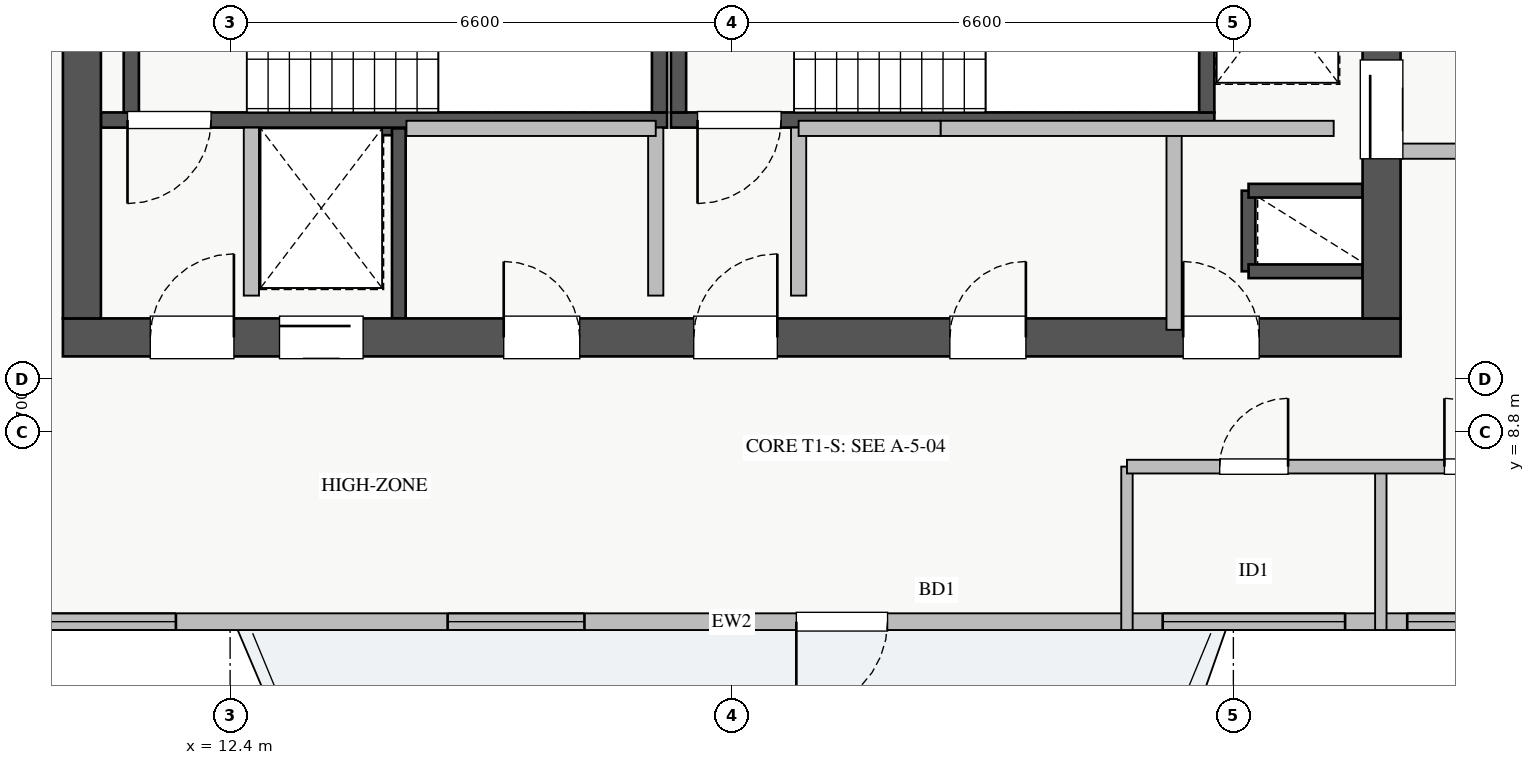
"""IFC4 building model, lengths in metres.
Left out: names, types, materials, properties, quantities, classifications, styles, units other than length and angle.
Written with IfcOpenShell. Run it as: python <this file> out.ifc"""

import sys

from ifc_helpers import new_model, si_unit, direction, frame, frame_2d, origin, place, context, subcontext, project, spatial, rectangle, extrude, source, transform, mapped, element, fill, save


model = new_model("IFC4")
c1 = context("Model", 3, precision=1e-05, world=origin(), true_north=direction((0.0, 1.0)))
c2 = subcontext(c1, "Body", "Model", "MODEL_VIEW")
j1 = project(units=[si_unit("LENGTHUNIT", "METRE"), si_unit("PLANEANGLEUNIT", "RADIAN")], contexts=[c1])
p1 = place(None, origin())
s1 = spatial("IfcSite", under=j1, at=p1, CompositionType="ELEMENT")
p2 = place(p1, origin())
s2 = spatial("IfcBuilding", under=s1, at=p2, CompositionType="ELEMENT")
p3 = place(p2, frame((0.0, 0.0, 197.0)))
s3 = spatial("IfcBuildingStorey", under=s2, at=p3, CompositionType="ELEMENT", Elevation=197.0)
p4 = place(p3, frame((12.68, 12.8, 0.0), z_axis=(0.0, 0.0, 1.0), x_axis=(1.0, 0.0, 0.0)))
e1 = element("IfcWall", 1, at=p4, inside=s3, PredefinedType="SHEAR", context=c2, shape_type="SweptSolid", body=[
    extrude(rectangle(XDim=1.94, YDim=0.18, at=frame_2d((0.97, 0.0))), origin(), (0.0, 0.0, 1.0), 3.07),
])
p5 = place(p3, frame((14.62, 10.3, 0.0), z_axis=(0.0, 0.0, 1.0), x_axis=(0.0, 1.0, 0.0)))
e2 = element("IfcWall", 2, at=p5, inside=s3, PredefinedType="SHEAR", context=c2, shape_type="SweptSolid", body=[
    extrude(rectangle(XDim=2.5, YDim=0.18, at=frame_2d((1.25, 0.0))), origin(), (0.0, 0.0, 1.0), 3.07),
])
p6 = place(p3, frame((25.8, 10.92, 0.0), z_axis=(0.0, 0.0, 1.0), x_axis=(0.0, 1.0, 0.0)))
e3 = element("IfcWall", 3, at=p6, inside=s3, PredefinedType="SHEAR", context=c2, shape_type="SweptSolid", body=[
    extrude(rectangle(XDim=1.06, YDim=0.18, at=frame_2d((0.53, 0.0))), origin(), (0.0, 0.0, 1.0), 3.07),
])
for number, where, z_axis, x_axis in (
    (4, (25.8, 11.98, 0.0), (0.0, 0.0, 1.0), (1.0, 0.0, 0.0)),
    (5, (25.8, 10.92, 0.0), (0.0, 0.0, 1.0), (1.0, 0.0, 0.0)),
):
    element("IfcWall", number, at=place(p3, frame(where, z_axis=z_axis, x_axis=x_axis)), inside=s3, PredefinedType="SHEAR", context=c2, shape_type="SweptSolid", body=[
        extrude(rectangle(XDim=1.5, YDim=0.18, at=frame_2d((0.75, 0.0))), origin(), (0.0, 0.0, 1.0), 3.07),
    ])
p7 = place(p3, frame((10.7, 12.91, 0.0), z_axis=(0.0, 0.0, 1.0), x_axis=(1.0, 0.0, 0.0)))
e6 = element("IfcWall", 6, at=p7, inside=s3, PredefinedType="SHEAR", context=c2, shape_type="SweptSolid", body=[
    extrude(rectangle(XDim=7.45, YDim=0.2, at=frame_2d((3.725, 0.0))), origin(), (0.0, 0.0, 1.0), 3.25),
])
p8 = place(p7, frame((0.35, 0.0, 0.0)))
e7 = element("IfcOpeningElement", 7, at=p8, cuts=e6, PredefinedType="OPENING", context=c2, shape_type="SweptSolid", body=[
    extrude(rectangle(XDim=1.1, YDim=2.05, at=frame_2d((0.55, 1.025))), frame((0.0, 0.11, 0.0), z_axis=(0.0, -1.0, 0.0), x_axis=(1.0, 0.0, 0.0)), (0.0, 0.0, 1.0), 0.22),
])
for number, where, z_axis, x_axis in (
    (8, (11.1, 13.01, 0.0), (0.0, 0.0, 1.0), (0.0, 1.0, 0.0)),
    (9, (18.05, 13.01, 0.0), (0.0, 0.0, 1.0), (0.0, 1.0, 0.0)),
):
    element("IfcWall", number, at=place(p3, frame(where, z_axis=z_axis, x_axis=x_axis)), inside=s3, PredefinedType="SHEAR", context=c2, shape_type="SweptSolid", body=[
        extrude(rectangle(XDim=2.94, YDim=0.2, at=frame_2d((1.47, 0.0))), origin(), (0.0, 0.0, 1.0), 3.25),
    ])
p9 = place(p3, frame((18.2, 12.91, 0.0), z_axis=(0.0, 0.0, 1.0), x_axis=(1.0, 0.0, 0.0)))
e10 = element("IfcWall", 10, at=p9, inside=s3, PredefinedType="SHEAR", context=c2, shape_type="SweptSolid", body=[
    extrude(rectangle(XDim=7.15, YDim=0.2, at=frame_2d((3.575, 0.0))), origin(), (0.0, 0.0, 1.0), 3.25),
])
p10 = place(p9, frame((0.35, 0.0, 0.0)))
e11 = element("IfcOpeningElement", 11, at=p10, cuts=e10, PredefinedType="OPENING", context=c2, shape_type="SweptSolid", body=[
    extrude(rectangle(XDim=1.1, YDim=2.05, at=frame_2d((0.55, 1.025))), frame((0.0, 0.11, 0.0), z_axis=(0.0, -1.0, 0.0), x_axis=(1.0, 0.0, 0.0)), (0.0, 0.0, 1.0), 0.22),
])
for number, where, z_axis, x_axis in (
    (12, (18.3, 13.01, 0.0), (0.0, 0.0, 1.0), (0.0, 1.0, 0.0)),
    (13, (25.25, 13.01, 0.0), (0.0, 0.0, 1.0), (0.0, 1.0, 0.0)),
):
    element("IfcWall", number, at=place(p3, frame(where, z_axis=z_axis, x_axis=x_axis)), inside=s3, PredefinedType="SHEAR", context=c2, shape_type="SweptSolid", body=[
        extrude(rectangle(XDim=2.94, YDim=0.2, at=frame_2d((1.47, 0.0))), origin(), (0.0, 0.0, 1.0), 3.25),
    ])
p11 = place(p3, frame((10.2, 10.05, 0.0), z_axis=(0.0, 0.0, 1.0), x_axis=(1.0, 0.0, 0.0)))
e14 = element("IfcWall", 14, at=p11, inside=s3, PredefinedType="SHEAR", context=c2, shape_type="SweptSolid", body=[
    extrude(rectangle(XDim=17.6, YDim=0.5, at=frame_2d((8.8, 0.0))), origin(), (0.0, 0.0, 1.0), 3.25),
])
p12 = place(p11, frame((1.15, 0.0, 0.0)))
e15 = element("IfcOpeningElement", 15, at=p12, cuts=e14, PredefinedType="OPENING", context=c2, shape_type="SweptSolid", body=[
    extrude(rectangle(XDim=1.1, YDim=2.05, at=frame_2d((0.55, 1.025))), frame((0.0, 0.26, 0.0), z_axis=(0.0, -1.0, 0.0), x_axis=(1.0, 0.0, 0.0)), (0.0, 0.0, 1.0), 0.52),
])
p13 = place(p11, frame((8.3, 0.0, 0.0)))
e16 = element("IfcOpeningElement", 16, at=p13, cuts=e14, PredefinedType="OPENING", context=c2, shape_type="SweptSolid", body=[
    extrude(rectangle(XDim=1.1, YDim=2.05, at=frame_2d((0.55, 1.025))), frame((0.0, 0.26, 0.0), z_axis=(0.0, -1.0, 0.0), x_axis=(1.0, 0.0, 0.0)), (0.0, 0.0, 1.0), 0.52),
])
p14 = place(p11, frame((2.85, 0.0, 0.0)))
e17 = element("IfcOpeningElement", 17, at=p14, cuts=e14, PredefinedType="OPENING", context=c2, shape_type="SweptSolid", body=[
    extrude(rectangle(XDim=1.1, YDim=2.05, at=frame_2d((0.55, 1.025))), frame((0.0, 0.26, 0.0), z_axis=(0.0, -1.0, 0.0), x_axis=(1.0, 0.0, 0.0)), (0.0, 0.0, 1.0), 0.52),
])
p15 = place(p11, frame((5.8, 0.0, 0.0)))
e18 = element("IfcOpeningElement", 18, at=p15, cuts=e14, PredefinedType="OPENING", context=c2, shape_type="SweptSolid", body=[
    extrude(rectangle(XDim=1.0, YDim=2.05, at=frame_2d((0.5, 1.025))), frame((0.0, 0.26, 0.0), z_axis=(0.0, -1.0, 0.0), x_axis=(1.0, 0.0, 0.0)), (0.0, 0.0, 1.0), 0.52),
])
p16 = place(p11, frame((14.74, 0.0, 0.0)))
e19 = element("IfcOpeningElement", 19, at=p16, cuts=e14, PredefinedType="OPENING", context=c2, shape_type="SweptSolid", body=[
    extrude(rectangle(XDim=1.0, YDim=2.05, at=frame_2d((0.5, 1.025))), frame((0.0, 0.26, 0.0), z_axis=(0.0, -1.0, 0.0), x_axis=(1.0, 0.0, 0.0)), (0.0, 0.0, 1.0), 0.52),
])
p17 = place(p11, frame((11.67, 0.0, 0.0)))
e20 = element("IfcOpeningElement", 20, at=p17, cuts=e14, PredefinedType="OPENING", context=c2, shape_type="SweptSolid", body=[
    extrude(rectangle(XDim=1.0, YDim=2.05, at=frame_2d((0.5, 1.025))), frame((0.0, 0.26, 0.0), z_axis=(0.0, -1.0, 0.0), x_axis=(1.0, 0.0, 0.0)), (0.0, 0.0, 1.0), 0.52),
])
p18 = place(p3, frame((10.45, 10.3, 0.0), z_axis=(0.0, 0.0, 1.0), x_axis=(0.0, 1.0, 0.0)))
e21 = element("IfcWall", 21, at=p18, inside=s3, PredefinedType="SHEAR", context=c2, shape_type="SweptSolid", body=[
    extrude(rectangle(XDim=6.2, YDim=0.5, at=frame_2d((3.1, 0.0))), origin(), (0.0, 0.0, 1.0), 3.25),
])
p19 = place(p3, frame((27.55, 10.3, 0.0), z_axis=(0.0, 0.0, 1.0), x_axis=(0.0, 1.0, 0.0)))
e22 = element("IfcWall", 22, at=p19, inside=s3, PredefinedType="SHEAR", context=c2, shape_type="SweptSolid", body=[
    extrude(rectangle(XDim=6.2, YDim=0.5, at=frame_2d((3.1, 0.0))), origin(), (0.0, 0.0, 1.0), 3.25),
])
p20 = place(p19, frame((2.1, 0.0, 0.0)))
e23 = element("IfcOpeningElement", 23, at=p20, cuts=e22, PredefinedType="OPENING", context=c2, shape_type="SweptSolid", body=[
    extrude(rectangle(XDim=1.3, YDim=2.05, at=frame_2d((0.65, 1.025))), frame((0.0, 0.26, 0.0), z_axis=(0.0, -1.0, 0.0), x_axis=(1.0, 0.0, 0.0)), (0.0, 0.0, 1.0), 0.52),
])
p21 = place(p3, frame((7.65, 6.31, 0.0), z_axis=(0.0, 0.0, 1.0), x_axis=(1.0, 0.0, 0.0)))
e24 = element("IfcWall", 24, at=p21, inside=s3, PredefinedType="STANDARD", context=c2, shape_type="SweptSolid", body=[
    extrude(rectangle(XDim=22.7, YDim=0.22, at=frame_2d((11.35, 0.0))), origin(), (0.0, 0.0, 1.0), 2.61),
])
p22 = place(p21, frame((12.2, 0.0, 0.0)))
e25 = element("IfcOpeningElement", 25, at=p22, cuts=e24, PredefinedType="OPENING", context=c2, shape_type="SweptSolid", body=[
    extrude(rectangle(XDim=1.2, YDim=2.1, at=frame_2d((0.6, 1.05))), frame((0.0, 0.12, 0.0), z_axis=(0.0, -1.0, 0.0), x_axis=(1.0, 0.0, 0.0)), (0.0, 0.0, 1.0), 0.24),
])
p23 = place(p21, frame((1.637, 0.0, 0.9)))
e26 = element("IfcOpeningElement", 26, at=p23, cuts=e24, PredefinedType="OPENING", context=c2, shape_type="SweptSolid", body=[
    extrude(rectangle(XDim=2.4, YDim=1.48, at=frame_2d((1.2, 0.74))), frame((0.0, 0.12, 0.0), z_axis=(0.0, -1.0, 0.0), x_axis=(1.0, 0.0, 0.0)), (0.0, 0.0, 1.0), 0.24),
])
p24 = place(p21, frame((7.612, 0.0, 0.9)))
e27 = element("IfcOpeningElement", 27, at=p24, cuts=e24, PredefinedType="OPENING", context=c2, shape_type="SweptSolid", body=[
    extrude(rectangle(XDim=1.8, YDim=1.45, at=frame_2d((0.9, 0.725))), frame((0.0, 0.12, 0.0), z_axis=(0.0, -1.0, 0.0), x_axis=(1.0, 0.0, 0.0)), (0.0, 0.0, 1.0), 0.24),
])
p25 = place(p21, frame((20.238, 0.0, 0.9)))
e28 = element("IfcOpeningElement", 28, at=p25, cuts=e24, PredefinedType="OPENING", context=c2, shape_type="SweptSolid", body=[
    extrude(rectangle(XDim=2.1, YDim=1.5, at=frame_2d((1.05, 0.75))), frame((0.0, 0.12, 0.0), z_axis=(0.0, -1.0, 0.0), x_axis=(1.0, 0.0, 0.0)), (0.0, 0.0, 1.0), 0.24),
])
p26 = place(p21, frame((17.02, 0.0, 0.9)))
e29 = element("IfcOpeningElement", 29, at=p26, cuts=e24, PredefinedType="OPENING", context=c2, shape_type="SweptSolid", body=[
    extrude(rectangle(XDim=2.4, YDim=1.5, at=frame_2d((1.2, 0.75))), frame((0.0, 0.12, 0.0), z_axis=(0.0, -1.0, 0.0), x_axis=(1.0, 0.0, 0.0)), (0.0, 0.0, 1.0), 0.24),
])
p27 = place(p3, frame((27.8, 12.5, 0.0), z_axis=(0.0, 0.0, 1.0), x_axis=(1.0, 0.0, 0.0)))
e30 = element("IfcWall", 30, at=p27, inside=s3, PredefinedType="PARTITIONING", context=c2, shape_type="SweptSolid", body=[
    extrude(rectangle(XDim=3.1, YDim=0.2, at=frame_2d((1.55, 0.0))), origin(), (0.0, 0.0, 1.0), 2.265),
])
for number, where, z_axis, x_axis in (
    (31, (12.68, 10.6, 0.0), (0.0, 0.0, 1.0), (0.0, 1.0, 0.0)),
    (32, (18.0, 10.6, 0.0), (0.0, 0.0, 1.0), (0.0, 1.0, 0.0)),
    (33, (19.88, 10.6, 0.0), (0.0, 0.0, 1.0), (0.0, 1.0, 0.0)),
):
    element("IfcWall", number, at=place(p3, frame(where, z_axis=z_axis, x_axis=x_axis)), inside=s3, PredefinedType="PARTITIONING", context=c2, shape_type="SweptSolid", body=[
        extrude(rectangle(XDim=2.21, YDim=0.2, at=frame_2d((1.105, 0.0))), origin(), (0.0, 0.0, 1.0), 3.07),
    ])
p28 = place(p3, frame((14.72, 12.8, 0.0), z_axis=(0.0, 0.0, 1.0), x_axis=(1.0, 0.0, 0.0)))
e34 = element("IfcWall", 34, at=p28, inside=s3, PredefinedType="PARTITIONING", context=c2, shape_type="SweptSolid", body=[
    extrude(rectangle(XDim=3.28, YDim=0.2, at=frame_2d((1.64, 0.0))), origin(), (0.0, 0.0, 1.0), 3.07),
])
p29 = place(p3, frame((24.82, 10.15, 0.0), z_axis=(0.0, 0.0, 1.0), x_axis=(0.0, 1.0, 0.0)))
e35 = element("IfcWall", 35, at=p29, inside=s3, PredefinedType="PARTITIONING", context=c2, shape_type="SweptSolid", body=[
    extrude(rectangle(XDim=2.65, YDim=0.2, at=frame_2d((1.325, 0.0))), origin(), (0.0, 0.0, 1.0), 3.07),
])
p30 = place(p3, frame((19.88, 12.8, 0.0), z_axis=(0.0, 0.0, 1.0), x_axis=(1.0, 0.0, 0.0)))
e36 = element("IfcWall", 36, at=p30, inside=s3, PredefinedType="PARTITIONING", context=c2, shape_type="SweptSolid", body=[
    extrude(rectangle(XDim=1.87, YDim=0.2, at=frame_2d((0.935, 0.0))), origin(), (0.0, 0.0, 1.0), 3.07),
])
p31 = place(p3, frame((21.75, 12.8, 0.0), z_axis=(0.0, 0.0, 1.0), x_axis=(1.0, 0.0, 0.0)))
e37 = element("IfcWall", 37, at=p31, inside=s3, PredefinedType="PARTITIONING", context=c2, shape_type="SweptSolid", body=[
    extrude(rectangle(XDim=5.17, YDim=0.2, at=frame_2d((2.585, 0.0))), origin(), (0.0, 0.0, 1.0), 3.07),
])
for number, where, z_axis, x_axis in (
    (38, (24.2, 6.2, 0.0), (0.0, 0.0, 1.0), (0.0, 1.0, 0.0)),
    (39, (27.54, 6.2, 0.0), (0.0, 0.0, 1.0), (0.0, 1.0, 0.0)),
):
    element("IfcWall", number, at=place(p3, frame(where, z_axis=z_axis, x_axis=x_axis)), inside=s3, PredefinedType="PARTITIONING", context=c2, shape_type="SweptSolid", body=[
        extrude(rectangle(XDim=2.15, YDim=0.15, at=frame_2d((1.075, 0.0))), origin(), (0.0, 0.0, 1.0), 3.07),
    ])
p32 = place(p3, frame((24.2, 8.35, 0.0), z_axis=(0.0, 0.0, 1.0), x_axis=(1.0, 0.0, 0.0)))
e40 = element("IfcWall", 40, at=p32, inside=s3, PredefinedType="PARTITIONING", context=c2, shape_type="SweptSolid", body=[
    extrude(rectangle(XDim=8.25, YDim=0.18, at=frame_2d((4.125, 0.0))), origin(), (0.0, 0.0, 1.0), 3.07),
])
p33 = place(p32, frame((1.22, 0.0, 0.0)))
e41 = element("IfcOpeningElement", 41, at=p33, cuts=e40, PredefinedType="OPENING", context=c2, shape_type="SweptSolid", body=[
    extrude(rectangle(XDim=0.9, YDim=2.05, at=frame_2d((0.45, 1.025))), frame((0.0, 0.1, 0.0), z_axis=(0.0, -1.0, 0.0), x_axis=(1.0, 0.0, 0.0)), (0.0, 0.0, 1.0), 0.2),
])
p34 = place(p32, frame((4.177, 0.0, 0.0)))
e42 = element("IfcOpeningElement", 42, at=p34, cuts=e40, PredefinedType="OPENING", context=c2, shape_type="SweptSolid", body=[
    extrude(rectangle(XDim=0.9, YDim=2.05, at=frame_2d((0.45, 1.025))), frame((0.0, 0.1, 0.0), z_axis=(0.0, -1.0, 0.0), x_axis=(1.0, 0.0, 0.0)), (0.0, 0.0, 1.0), 0.2),
])
m1 = source(origin(), c2, "Body", "SweptSolid", [
    extrude(rectangle(XDim=1.2, YDim=2.1, at=frame_2d((0.6, 1.05))), frame((0.0, 0.025, 0.0), z_axis=(0.0, -1.0, 0.0), x_axis=(1.0, 0.0, 0.0)), (0.0, 0.0, 1.0), 0.05),
])
p35 = place(p22, frame((1.2, 0.0, 0.0), z_axis=(0.0, 0.0, 1.0), x_axis=(-1.0, 0.0, 0.0)))
e43 = element("IfcDoor", 43, at=p35, inside=s3, OperationType="SINGLE_SWING_LEFT", PredefinedType="DOOR", context=c2, shape_type="MappedRepresentation", body=[
    mapped(m1, transform((0.0, 0.0, 0.0), x_axis=(1.0, 0.0, 0.0), y_axis=(0.0, 1.0, 0.0), z_axis=(0.0, 0.0, 1.0), scale=1.0)),
])
fill(e25, e43)
m2 = source(origin(), c2, "Body", "SweptSolid", [
    extrude(rectangle(XDim=2.4, YDim=1.48, at=frame_2d((1.2, 0.74))), frame((0.0, 0.03, 0.0), z_axis=(0.0, -1.0, 0.0), x_axis=(1.0, 0.0, 0.0)), (0.0, 0.0, 1.0), 0.06),
])
p36 = place(p23, origin())
e44 = element("IfcWindow", 44, at=p36, inside=s3, PartitioningType="TRIPLE_PANEL_VERTICAL", PredefinedType="WINDOW", context=c2, shape_type="MappedRepresentation", body=[
    mapped(m2, transform((0.0, 0.0, 0.0), x_axis=(1.0, 0.0, 0.0), y_axis=(0.0, 1.0, 0.0), z_axis=(0.0, 0.0, 1.0), scale=1.0)),
])
fill(e26, e44)
m3 = source(origin(), c2, "Body", "SweptSolid", [
    extrude(rectangle(XDim=1.8, YDim=1.45, at=frame_2d((0.9, 0.725))), frame((0.0, 0.03, 0.0), z_axis=(0.0, -1.0, 0.0), x_axis=(1.0, 0.0, 0.0)), (0.0, 0.0, 1.0), 0.06),
])
p37 = place(p24, origin())
e45 = element("IfcWindow", 45, at=p37, inside=s3, PartitioningType="DOUBLE_PANEL_VERTICAL", PredefinedType="WINDOW", context=c2, shape_type="MappedRepresentation", body=[
    mapped(m3, transform((0.0, 0.0, 0.0), x_axis=(1.0, 0.0, 0.0), y_axis=(0.0, 1.0, 0.0), z_axis=(0.0, 0.0, 1.0), scale=1.0)),
])
fill(e27, e45)
m4 = source(origin(), c2, "Body", "SweptSolid", [
    extrude(rectangle(XDim=2.1, YDim=1.5, at=frame_2d((1.05, 0.75))), frame((0.0, 0.03, 0.0), z_axis=(0.0, -1.0, 0.0), x_axis=(1.0, 0.0, 0.0)), (0.0, 0.0, 1.0), 0.06),
])
p38 = place(p25, origin())
e46 = element("IfcWindow", 46, at=p38, inside=s3, PartitioningType="TRIPLE_PANEL_VERTICAL", PredefinedType="WINDOW", context=c2, shape_type="MappedRepresentation", body=[
    mapped(m4, transform((0.0, 0.0, 0.0), x_axis=(1.0, 0.0, 0.0), y_axis=(0.0, 1.0, 0.0), z_axis=(0.0, 0.0, 1.0), scale=1.0)),
])
fill(e28, e46)
m5 = source(origin(), c2, "Body", "SweptSolid", [
    extrude(rectangle(XDim=1.3, YDim=2.05, at=frame_2d((0.65, 1.025))), frame((0.0, 0.025, 0.0), z_axis=(0.0, -1.0, 0.0), x_axis=(1.0, 0.0, 0.0)), (0.0, 0.0, 1.0), 0.05),
])
p39 = place(p20, origin())
e47 = element("IfcDoor", 47, at=p39, inside=s3, OperationType="SLIDING_TO_RIGHT", PredefinedType="DOOR", context=c2, shape_type="MappedRepresentation", body=[
    mapped(m5, transform((0.0, 0.0, 0.0), x_axis=(1.0, 0.0, 0.0), y_axis=(0.0, 1.0, 0.0), z_axis=(0.0, 0.0, 1.0), scale=1.0)),
])
fill(e23, e47)
m6 = source(origin(), c2, "Body", "SweptSolid", [
    extrude(rectangle(XDim=1.1, YDim=2.05, at=frame_2d((0.55, 1.025))), frame((0.0, 0.025, 0.0), z_axis=(0.0, -1.0, 0.0), x_axis=(1.0, 0.0, 0.0)), (0.0, 0.0, 1.0), 0.05),
])
p40 = place(p12, origin())
e48 = element("IfcDoor", 48, at=p40, inside=s3, OperationType="SINGLE_SWING_RIGHT", PredefinedType="DOOR", context=c2, shape_type="MappedRepresentation", body=[
    mapped(m6, transform((0.0, 0.0, 0.0), x_axis=(1.0, 0.0, 0.0), y_axis=(0.0, 1.0, 0.0), z_axis=(0.0, 0.0, 1.0), scale=1.0)),
])
fill(e15, e48)
p41 = place(p8, frame((1.1, 0.0, 0.0), z_axis=(0.0, 0.0, 1.0), x_axis=(-1.0, 0.0, 0.0)))
e49 = element("IfcDoor", 49, at=p41, inside=s3, OperationType="SINGLE_SWING_LEFT", PredefinedType="DOOR", context=c2, shape_type="MappedRepresentation", body=[
    mapped(m6, transform((0.0, 0.0, 0.0), x_axis=(1.0, 0.0, 0.0), y_axis=(0.0, 1.0, 0.0), z_axis=(0.0, 0.0, 1.0), scale=1.0)),
])
fill(e7, e49)
p42 = place(p13, origin())
e50 = element("IfcDoor", 50, at=p42, inside=s3, OperationType="SINGLE_SWING_RIGHT", PredefinedType="DOOR", context=c2, shape_type="MappedRepresentation", body=[
    mapped(m6, transform((0.0, 0.0, 0.0), x_axis=(1.0, 0.0, 0.0), y_axis=(0.0, 1.0, 0.0), z_axis=(0.0, 0.0, 1.0), scale=1.0)),
])
fill(e16, e50)
p43 = place(p10, frame((1.1, 0.0, 0.0), z_axis=(0.0, 0.0, 1.0), x_axis=(-1.0, 0.0, 0.0)))
e51 = element("IfcDoor", 51, at=p43, inside=s3, OperationType="SINGLE_SWING_LEFT", PredefinedType="DOOR", context=c2, shape_type="MappedRepresentation", body=[
    mapped(m6, transform((0.0, 0.0, 0.0), x_axis=(1.0, 0.0, 0.0), y_axis=(0.0, 1.0, 0.0), z_axis=(0.0, 0.0, 1.0), scale=1.0)),
])
fill(e11, e51)
p44 = place(p14, origin())
e52 = element("IfcDoor", 52, at=p44, inside=s3, OperationType="SLIDING_TO_RIGHT", PredefinedType="DOOR", context=c2, shape_type="MappedRepresentation", body=[
    mapped(m6, transform((0.0, 0.0, 0.0), x_axis=(1.0, 0.0, 0.0), y_axis=(0.0, 1.0, 0.0), z_axis=(0.0, 0.0, 1.0), scale=1.0)),
])
fill(e17, e52)
m7 = source(origin(), c2, "Body", "SweptSolid", [
    extrude(rectangle(XDim=1.0, YDim=2.05, at=frame_2d((0.5, 1.025))), frame((0.0, 0.025, 0.0), z_axis=(0.0, -1.0, 0.0), x_axis=(1.0, 0.0, 0.0)), (0.0, 0.0, 1.0), 0.05),
])
p45 = place(p15, origin())
e53 = element("IfcDoor", 53, at=p45, inside=s3, OperationType="SINGLE_SWING_LEFT", PredefinedType="DOOR", context=c2, shape_type="MappedRepresentation", body=[
    mapped(m7, transform((0.0, 0.0, 0.0), x_axis=(1.0, 0.0, 0.0), y_axis=(0.0, 1.0, 0.0), z_axis=(0.0, 0.0, 1.0), scale=1.0)),
])
fill(e18, e53)
p46 = place(p16, origin())
e54 = element("IfcDoor", 54, at=p46, inside=s3, OperationType="SINGLE_SWING_LEFT", PredefinedType="DOOR", context=c2, shape_type="MappedRepresentation", body=[
    mapped(m7, transform((0.0, 0.0, 0.0), x_axis=(1.0, 0.0, 0.0), y_axis=(0.0, 1.0, 0.0), z_axis=(0.0, 0.0, 1.0), scale=1.0)),
])
fill(e19, e54)
p47 = place(p17, origin())
e55 = element("IfcDoor", 55, at=p47, inside=s3, OperationType="SINGLE_SWING_RIGHT", PredefinedType="DOOR", context=c2, shape_type="MappedRepresentation", body=[
    mapped(m7, transform((0.0, 0.0, 0.0), x_axis=(1.0, 0.0, 0.0), y_axis=(0.0, 1.0, 0.0), z_axis=(0.0, 0.0, 1.0), scale=1.0)),
])
fill(e20, e55)
m8 = source(origin(), c2, "Body", "SweptSolid", [
    extrude(rectangle(XDim=0.9, YDim=2.05, at=frame_2d((0.45, 1.025))), frame((0.0, 0.025, 0.0), z_axis=(0.0, -1.0, 0.0), x_axis=(1.0, 0.0, 0.0)), (0.0, 0.0, 1.0), 0.05),
])
p48 = place(p33, origin())
e56 = element("IfcDoor", 56, at=p48, inside=s3, OperationType="SINGLE_SWING_RIGHT", PredefinedType="DOOR", context=c2, shape_type="MappedRepresentation", body=[
    mapped(m8, transform((0.0, 0.0, 0.0), x_axis=(1.0, 0.0, 0.0), y_axis=(0.0, 1.0, 0.0), z_axis=(0.0, 0.0, 1.0), scale=1.0)),
])
fill(e41, e56)
p49 = place(p34, origin())
e57 = element("IfcDoor", 57, at=p49, inside=s3, OperationType="SINGLE_SWING_LEFT", PredefinedType="DOOR", context=c2, shape_type="MappedRepresentation", body=[
    mapped(m8, transform((0.0, 0.0, 0.0), x_axis=(1.0, 0.0, 0.0), y_axis=(0.0, 1.0, 0.0), z_axis=(0.0, 0.0, 1.0), scale=1.0)),
])
fill(e42, e57)
m9 = source(origin(), c2, "Body", "SweptSolid", [
    extrude(rectangle(XDim=2.4, YDim=1.5, at=frame_2d((1.2, 0.75))), frame((0.0, 0.03, 0.0), z_axis=(0.0, -1.0, 0.0), x_axis=(1.0, 0.0, 0.0)), (0.0, 0.0, 1.0), 0.06),
])
p50 = place(p26, origin())
e58 = element("IfcWindow", 58, at=p50, inside=s3, PartitioningType="TRIPLE_PANEL_VERTICAL", PredefinedType="WINDOW", context=c2, shape_type="MappedRepresentation", body=[
    mapped(m9, transform((0.0, 0.0, 0.0), x_axis=(1.0, 0.0, 0.0), y_axis=(0.0, 1.0, 0.0), z_axis=(0.0, 0.0, 1.0), scale=1.0)),
])
fill(e29, e58)
save(model, sys.argv[1])
